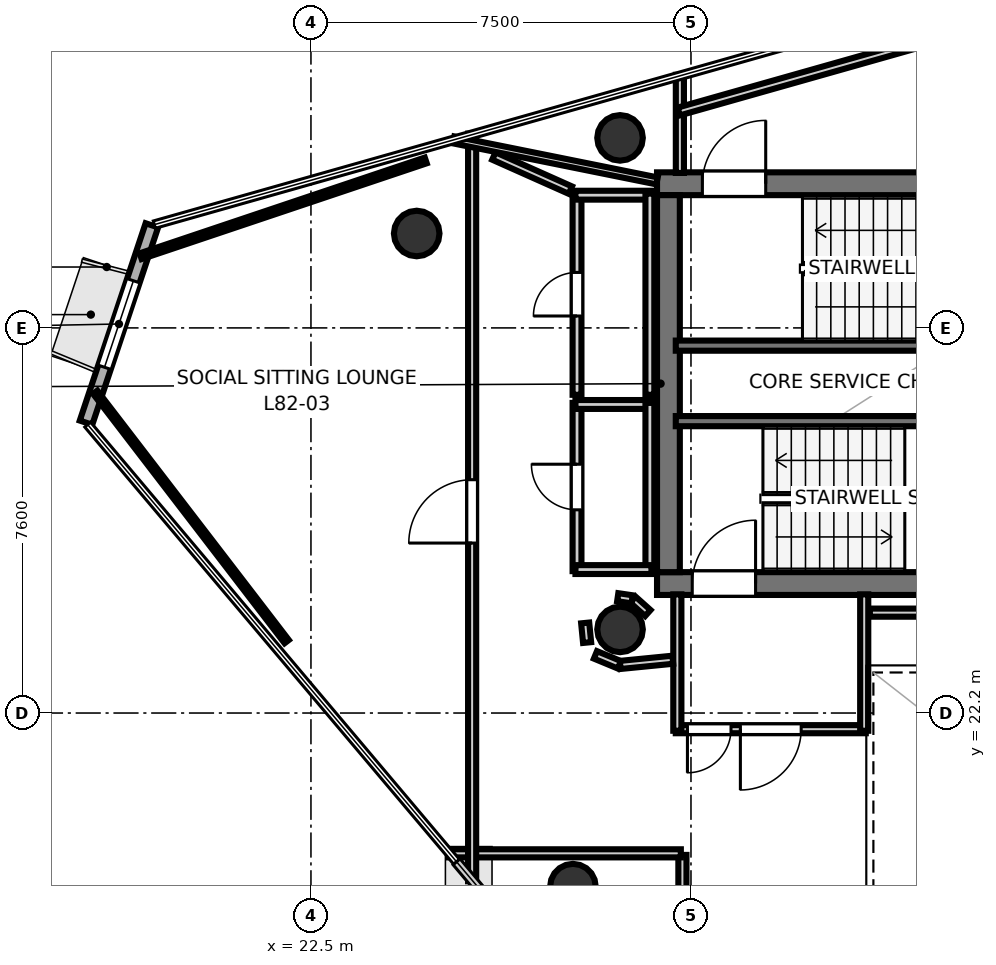
"""IFC4 building model, lengths in metres.
Left out: names, types, materials, properties, quantities, classifications, styles, units other than length and angle.
Written with IfcOpenShell. Run it as: python <this file> out.ifc"""

import sys

from ifc_helpers import new_model, si_unit, direction, frame, frame_2d, origin, origin_2d, place, context, subcontext, project, spatial, rectangle, hollow_circle, extrude, element, fill, save


model = new_model("IFC4")
c1 = context("Model", 3, precision=1e-05, world=origin(), true_north=direction((0.0, 1.0)))
c2 = subcontext(c1, "Body", "Model", "MODEL_VIEW")
j1 = project(units=[si_unit("LENGTHUNIT", "METRE"), si_unit("PLANEANGLEUNIT", "RADIAN")], contexts=[c1])
p1 = place(None, origin())
s1 = spatial("IfcSite", under=j1, at=p1, CompositionType="ELEMENT")
p2 = place(p1, origin())
s2 = spatial("IfcBuilding", under=s1, at=p2, CompositionType="ELEMENT")
p3 = place(p2, frame((0.0, 0.0, 317.6)))
s3 = spatial("IfcBuildingStorey", under=s2, at=p3, CompositionType="ELEMENT", Elevation=317.6)
p4 = place(p3, frame((29.33, 32.645, 0.0), z_axis=(0.0, 0.0, 1.0), x_axis=(1.0, 0.0, 0.0)))
e1 = element("IfcWall", 1, at=p4, inside=s3, PredefinedType="SHEAR", context=c2, shape_type="SweptSolid", body=[
    extrude(rectangle(XDim=10.52, YDim=0.45, at=frame_2d((5.26, 0.0))), origin(), (0.0, 0.0, 1.0), 3.4),
])
p5 = place(p4, frame((0.895, 0.0, 0.0)))
e2 = element("IfcOpeningElement", 2, at=p5, cuts=e1, PredefinedType="OPENING", context=c2, shape_type="SweptSolid", body=[
    extrude(rectangle(XDim=1.25, YDim=2.15, at=frame_2d((0.625, 1.075))), frame((0.0, 0.235, 0.0), z_axis=(0.0, -1.0, 0.0), x_axis=(1.0, 0.0, 0.0)), (0.0, 0.0, 1.0), 0.47),
])
p6 = place(p3, frame((29.33, 24.755, 0.0), z_axis=(0.0, 0.0, 1.0), x_axis=(1.0, 0.0, 0.0)))
e3 = element("IfcWall", 3, at=p6, inside=s3, PredefinedType="SHEAR", context=c2, shape_type="SweptSolid", body=[
    extrude(rectangle(XDim=10.52, YDim=0.45, at=frame_2d((5.26, 0.0))), origin(), (0.0, 0.0, 1.0), 3.4),
])
p7 = place(p6, frame((0.695, 0.0, 0.0)))
e4 = element("IfcOpeningElement", 4, at=p7, cuts=e3, PredefinedType="OPENING", context=c2, shape_type="SweptSolid", body=[
    extrude(rectangle(XDim=1.25, YDim=2.15, at=frame_2d((0.625, 1.075))), frame((0.0, 0.235, 0.0), z_axis=(0.0, -1.0, 0.0), x_axis=(1.0, 0.0, 0.0)), (0.0, 0.0, 1.0), 0.47),
])
p8 = place(p3, frame((29.555, 24.98, 0.0), z_axis=(0.0, 0.0, 1.0), x_axis=(0.0, 1.0, 0.0)))
e5 = element("IfcWall", 5, at=p8, inside=s3, PredefinedType="SHEAR", context=c2, shape_type="SweptSolid", body=[
    extrude(rectangle(XDim=7.44, YDim=0.45, at=frame_2d((3.72, 0.0))), origin(), (0.0, 0.0, 1.0), 3.4),
])
for number, where, z_axis, x_axis in (
    (6, (28.6, 33.55, 0.0), (0.0, 0.0, 1.0), (1.0, 0.0, 0.0)),
    (7, (28.6, 23.85, 0.0), (0.0, 0.0, 1.0), (1.0, 0.0, 0.0)),
    (8, (24.587, 31.663, 0.0), (0.0, 0.0, 1.0), (1.0, 0.0, 0.0)),
    (9, (27.67, 18.774, 0.0), (0.0, 0.0, 1.0), (1.0, 0.0, 0.0)),
):
    element("IfcColumn", number, at=place(p3, frame(where, z_axis=z_axis, x_axis=x_axis)), inside=s3, PredefinedType="COLUMN", context=c2, shape_type="SweptSolid", body=[
        extrude(hollow_circle(Radius=0.45, WallThickness=0.025, at=origin_2d()), origin(), (0.0, 0.0, 1.0), 3.7),
    ])
p9 = place(p3, frame((19.36, 31.824, 0.0), z_axis=(0.0, 0.0, 1.0), x_axis=(-0.316566733313, -0.948570241658, 0.0)))
e10 = element("IfcWall", 10, at=p9, inside=s3, PredefinedType="SOLIDWALL", context=c2, shape_type="SweptSolid", body=[
    extrude(rectangle(XDim=4.105, YDim=0.26, at=frame_2d((2.053, 0.0))), origin(), (0.0, 0.0, 1.0), 3.4),
])
p10 = place(p9, frame((1.153, 0.0, 0.85)))
e11 = element("IfcOpeningElement", 11, at=p10, cuts=e10, PredefinedType="OPENING", context=c2, shape_type="SweptSolid", body=[
    extrude(rectangle(XDim=1.8, YDim=2.1, at=frame_2d((0.9, 1.05))), frame((0.0, 0.14, 0.0), z_axis=(0.0, -1.0, 0.0), x_axis=(1.0, 0.0, 0.0)), (0.0, 0.0, 1.0), 0.28),
])
p11 = place(p3, frame((29.7, 29.45, 0.0), z_axis=(0.0, 0.0, 1.0), x_axis=(1.0, 0.0, 0.0)))
e12 = element("IfcWall", 12, at=p11, inside=s3, PredefinedType="SOLIDWALL", context=c2, shape_type="SweptSolid", body=[
    extrude(rectangle(XDim=8.3, YDim=0.2, at=frame_2d((4.15, 0.0))), origin(), (0.0, 0.0, 1.0), 3.4),
])
p12 = place(p3, frame((29.7, 27.96, 0.0), z_axis=(0.0, 0.0, 1.0), x_axis=(1.0, 0.0, 0.0)))
e13 = element("IfcWall", 13, at=p12, inside=s3, PredefinedType="SOLIDWALL", context=c2, shape_type="SweptSolid", body=[
    extrude(rectangle(XDim=7.75, YDim=0.2, at=frame_2d((3.875, 0.0))), origin(), (0.0, 0.0, 1.0), 3.4),
])
p13 = place(p3, frame((29.781, 32.858, 0.0), z_axis=(0.0, 0.0, 1.0), x_axis=(0.0, 1.0, 0.0)))
e14 = element("IfcWall", 14, at=p13, inside=s3, PredefinedType="PARTITIONING", context=c2, shape_type="SweptSolid", body=[
    extrude(rectangle(XDim=1.937, YDim=0.16, at=frame_2d((0.968, 0.0))), origin(), (0.0, 0.0, 1.0), 2.72),
])
p14 = place(p3, frame((29.758, 34.071, 0.0), z_axis=(0.0, 0.0, 1.0), x_axis=(0.962177906446, 0.272421872006, 0.0)))
e15 = element("IfcWall", 15, at=p14, inside=s3, PredefinedType="PARTITIONING", context=c2, shape_type="SweptSolid", body=[
    extrude(rectangle(XDim=7.379, YDim=0.16, at=frame_2d((3.689, 0.0))), origin(), (0.0, 0.0, 1.0), 2.72),
])
p15 = place(p3, frame((33.45, 21.881, 0.0), z_axis=(0.0, 0.0, 1.0), x_axis=(-1.0, 0.0, 0.0)))
e16 = element("IfcWall", 16, at=p15, inside=s3, PredefinedType="PARTITIONING", context=c2, shape_type="SweptSolid", body=[
    extrude(rectangle(XDim=3.75, YDim=0.16, at=frame_2d((1.875, 0.0))), origin(), (0.0, 0.0, 1.0), 2.72),
])
p16 = place(p15, frame((1.275, 0.0, 0.0)))
e17 = element("IfcOpeningElement", 17, at=p16, cuts=e16, PredefinedType="OPENING", context=c2, shape_type="SweptSolid", body=[
    extrude(rectangle(XDim=1.2, YDim=2.15, at=frame_2d((0.6, 1.075))), frame((0.0, 0.09, 0.0), z_axis=(0.0, -1.0, 0.0), x_axis=(1.0, 0.0, 0.0)), (0.0, 0.0, 1.0), 0.18),
])
p17 = place(p15, frame((2.66, 0.0, 0.0)))
e18 = element("IfcOpeningElement", 18, at=p17, cuts=e16, PredefinedType="OPENING", context=c2, shape_type="SweptSolid", body=[
    extrude(rectangle(XDim=0.86, YDim=2.05, at=frame_2d((0.43, 1.025))), frame((0.0, 0.09, 0.0), z_axis=(0.0, -1.0, 0.0), x_axis=(1.0, 0.0, 0.0)), (0.0, 0.0, 1.0), 0.18),
])
for number, where, z_axis, x_axis in (
    (19, (29.731, 21.85, 0.0), (0.0, 0.0, 1.0), (0.0, 1.0, 0.0)),
    (20, (33.419, 24.542, 0.0), (0.0, 0.0, 1.0), (0.0, -1.0, 0.0)),
):
    element("IfcWall", number, at=place(p3, frame(where, z_axis=z_axis, x_axis=x_axis)), inside=s3, PredefinedType="PARTITIONING", context=c2, shape_type="SweptSolid", body=[
        extrude(rectangle(XDim=2.692, YDim=0.16, at=frame_2d((1.346, 0.0))), origin(), (0.0, 0.0, 1.0), 2.72),
    ])
p18 = place(p3, frame((27.751, 25.0, 0.0), z_axis=(0.0, 0.0, 1.0), x_axis=(0.0, 1.0, 0.0)))
e21 = element("IfcWall", 21, at=p18, inside=s3, PredefinedType="PLUMBINGWALL", context=c2, shape_type="SweptSolid", body=[
    extrude(rectangle(XDim=3.32, YDim=0.175, at=frame_2d((1.66, 0.0))), origin(), (0.0, 0.0, 1.0), 2.72),
])
p19 = place(p18, frame((1.21, 0.0, 0.0)))
e22 = element("IfcOpeningElement", 22, at=p19, cuts=e21, PredefinedType="OPENING", context=c2, shape_type="SweptSolid", body=[
    extrude(rectangle(XDim=0.9, YDim=2.1, at=frame_2d((0.45, 1.05))), frame((0.0, 0.097, 0.0), z_axis=(0.0, -1.0, 0.0), x_axis=(1.0, 0.0, 0.0)), (0.0, 0.0, 1.0), 0.195),
])
p20 = place(p3, frame((27.72, 28.289, 0.0), z_axis=(0.0, 0.0, 1.0), x_axis=(1.0, 0.0, 0.0)))
e23 = element("IfcWall", 23, at=p20, inside=s3, PredefinedType="PLUMBINGWALL", context=c2, shape_type="SweptSolid", body=[
    extrude(rectangle(XDim=1.5, YDim=0.175, at=frame_2d((0.75, 0.0))), origin(), (0.0, 0.0, 1.0), 2.72),
])
p21 = place(p3, frame((29.189, 28.32, 0.0), z_axis=(0.0, 0.0, 1.0), x_axis=(0.0, -1.0, 0.0)))
e24 = element("IfcWall", 24, at=p21, inside=s3, PredefinedType="PLUMBINGWALL", context=c2, shape_type="SweptSolid", body=[
    extrude(rectangle(XDim=3.32, YDim=0.175, at=frame_2d((1.66, 0.0))), origin(), (0.0, 0.0, 1.0), 2.72),
])
p22 = place(p3, frame((29.22, 25.031, 0.0), z_axis=(0.0, 0.0, 1.0), x_axis=(-1.0, 0.0, 0.0)))
e25 = element("IfcWall", 25, at=p22, inside=s3, PredefinedType="PLUMBINGWALL", context=c2, shape_type="SweptSolid", body=[
    extrude(rectangle(XDim=1.5, YDim=0.175, at=frame_2d((0.75, 0.0))), origin(), (0.0, 0.0, 1.0), 2.72),
])
p23 = place(p3, frame((27.751, 28.48, 0.0), z_axis=(0.0, 0.0, 1.0), x_axis=(0.0, 1.0, 0.0)))
e26 = element("IfcWall", 26, at=p23, inside=s3, PredefinedType="PLUMBINGWALL", context=c2, shape_type="SweptSolid", body=[
    extrude(rectangle(XDim=3.97, YDim=0.175, at=frame_2d((1.985, 0.0))), origin(), (0.0, 0.0, 1.0), 2.72),
])
p24 = place(p23, frame((1.555, 0.0, 0.0)))
e27 = element("IfcOpeningElement", 27, at=p24, cuts=e26, PredefinedType="OPENING", context=c2, shape_type="SweptSolid", body=[
    extrude(rectangle(XDim=0.86, YDim=2.05, at=frame_2d((0.43, 1.025))), frame((0.0, 0.097, 0.0), z_axis=(0.0, -1.0, 0.0), x_axis=(1.0, 0.0, 0.0)), (0.0, 0.0, 1.0), 0.195),
])
p25 = place(p3, frame((27.72, 32.419, 0.0), z_axis=(0.0, 0.0, 1.0), x_axis=(1.0, 0.0, 0.0)))
e28 = element("IfcWall", 28, at=p25, inside=s3, PredefinedType="PLUMBINGWALL", context=c2, shape_type="SweptSolid", body=[
    extrude(rectangle(XDim=1.5, YDim=0.175, at=frame_2d((0.75, 0.0))), origin(), (0.0, 0.0, 1.0), 2.72),
])
p26 = place(p3, frame((29.189, 32.45, 0.0), z_axis=(0.0, 0.0, 1.0), x_axis=(0.0, -1.0, 0.0)))
e29 = element("IfcWall", 29, at=p26, inside=s3, PredefinedType="PLUMBINGWALL", context=c2, shape_type="SweptSolid", body=[
    extrude(rectangle(XDim=3.97, YDim=0.175, at=frame_2d((1.985, 0.0))), origin(), (0.0, 0.0, 1.0), 2.72),
])
p27 = place(p3, frame((29.149, 24.173, 0.0), z_axis=(0.0, 0.0, 1.0), x_axis=(-0.745225165416, 0.666812906917, 0.0)))
e30 = element("IfcWall", 30, at=p27, inside=s3, PredefinedType="PARTITIONING", context=c2, shape_type="SweptSolid", body=[
    extrude(rectangle(XDim=0.396, YDim=0.16, at=frame_2d((0.198, 0.0))), origin(), (0.0, 0.0, 1.0), 2.72),
])
p28 = place(p3, frame((28.838, 24.444, 0.0), z_axis=(0.0, 0.0, 1.0), x_axis=(-0.989449148305, 0.144880581578, 0.0)))
e31 = element("IfcWall", 31, at=p28, inside=s3, PredefinedType="PARTITIONING", context=c2, shape_type="SweptSolid", body=[
    extrude(rectangle(XDim=0.286, YDim=0.16, at=frame_2d((0.143, 0.0))), origin(), (0.0, 0.0, 1.0), 2.72),
])
p29 = place(p3, frame((37.872, 24.181, 0.0), z_axis=(0.0, 0.0, 1.0), x_axis=(-1.0, 0.0, 0.0)))
e32 = element("IfcWall", 32, at=p29, inside=s3, PredefinedType="PARTITIONING", context=c2, shape_type="SweptSolid", body=[
    extrude(rectangle(XDim=4.342, YDim=0.16, at=frame_2d((2.171, 0.0))), origin(), (0.0, 0.0, 1.0), 2.72),
])
p30 = place(p3, frame((26.11, 33.192, 0.0), z_axis=(0.0, 0.0, 1.0), x_axis=(0.913360499666, -0.407151811553, 0.0)))
e33 = element("IfcWall", 33, at=p30, inside=s3, PredefinedType="PARTITIONING", context=c2, shape_type="SweptSolid", body=[
    extrude(rectangle(XDim=1.654, YDim=0.16, at=frame_2d((0.827, 0.0))), origin(), (0.0, 0.0, 1.0), 2.72),
])
p31 = place(p3, frame((27.912, 23.978, 0.0), z_axis=(0.0, 0.0, 1.0), x_axis=(0.097888269922, -0.995197410875, 0.0)))
e34 = element("IfcWall", 34, at=p31, inside=s3, PredefinedType="PARTITIONING", context=c2, shape_type="SweptSolid", body=[
    extrude(rectangle(XDim=0.389, YDim=0.16, at=frame_2d((0.195, 0.0))), origin(), (0.0, 0.0, 1.0), 2.72),
])
p32 = place(p3, frame((28.115, 23.348, 0.0), z_axis=(0.0, 0.0, 1.0), x_axis=(0.923807847969, -0.382856448334, 0.0)))
e35 = element("IfcWall", 35, at=p32, inside=s3, PredefinedType="PARTITIONING", context=c2, shape_type="SweptSolid", body=[
    extrude(rectangle(XDim=0.513, YDim=0.16, at=frame_2d((0.256, 0.0))), origin(), (0.0, 0.0, 1.0), 2.72),
])
p33 = place(p3, frame((28.603, 23.149, 0.0), z_axis=(0.0, 0.0, 1.0), x_axis=(0.995179827095, 0.098066873836, 0.0)))
e36 = element("IfcWall", 36, at=p33, inside=s3, PredefinedType="PARTITIONING", context=c2, shape_type="SweptSolid", body=[
    extrude(rectangle(XDim=1.043, YDim=0.16, at=frame_2d((0.521, 0.0))), origin(), (0.0, 0.0, 1.0), 2.72),
])
p34 = place(p3, frame((29.831, 16.05, 0.0), z_axis=(0.0, 0.0, 1.0), x_axis=(0.0, 1.0, 0.0)))
e37 = element("IfcWall", 37, at=p34, inside=s3, PredefinedType="PARTITIONING", context=c2, shape_type="SweptSolid", body=[
    extrude(rectangle(XDim=3.35, YDim=0.16, at=frame_2d((1.675, 0.0))), origin(), (0.0, 0.0, 1.0), 2.72),
])
p35 = place(p3, frame((29.8, 19.431, 0.0), z_axis=(0.0, 0.0, 1.0), x_axis=(-1.0, 0.0, 0.0)))
e38 = element("IfcWall", 38, at=p35, inside=s3, PredefinedType="PARTITIONING", context=c2, shape_type="SweptSolid", body=[
    extrude(rectangle(XDim=4.587, YDim=0.16, at=frame_2d((2.293, 0.0))), origin(), (0.0, 0.0, 1.0), 2.72),
])
p36 = place(p3, frame((25.681, 18.88, 0.0), z_axis=(0.0, 0.0, 1.0), x_axis=(0.0, 1.0, 0.0)))
e39 = element("IfcWall", 39, at=p36, inside=s3, PredefinedType="PARTITIONING", context=c2, shape_type="SweptSolid", body=[
    extrude(rectangle(XDim=14.754, YDim=0.16, at=frame_2d((7.377, 0.0))), origin(), (0.0, 0.0, 1.0), 2.72),
])
p37 = place(p36, frame((6.674, 0.0, 0.0)))
e40 = element("IfcOpeningElement", 40, at=p37, cuts=e39, PredefinedType="OPENING", context=c2, shape_type="SweptSolid", body=[
    extrude(rectangle(XDim=1.25, YDim=2.2, at=frame_2d((0.625, 1.1))), frame((0.0, 0.09, 0.0), z_axis=(0.0, -1.0, 0.0), x_axis=(1.0, 0.0, 0.0)), (0.0, 0.0, 1.0), 0.18),
])
p38 = place(p3, frame((29.33, 32.701, 0.0), z_axis=(0.0, 0.0, 1.0), x_axis=(-0.980269851438, 0.197663902525, 0.0)))
e41 = element("IfcWall", 41, at=p38, inside=s3, PredefinedType="PARTITIONING", context=c2, shape_type="SweptSolid", body=[
    extrude(rectangle(XDim=4.094, YDim=0.14, at=frame_2d((2.047, 0.0))), origin(), (0.0, 0.0, 1.0), 2.72),
])
p39 = place(p3, frame((22.021, 23.609, 0.0), z_axis=(0.0, 0.0, 1.0), x_axis=(-0.609046833967, 0.793134259779, 0.0)))
e42 = element("IfcWall", 42, at=p39, inside=s3, PredefinedType="PARTITIONING", context=c2, shape_type="SweptSolid", body=[
    extrude(rectangle(XDim=6.204, YDim=0.105, at=frame_2d((3.102, 0.0))), origin(), (0.0, 0.0, 1.0), 2.72),
])
p40 = place(p3, frame((19.14, 31.215, 0.0), z_axis=(0.0, 0.0, 1.0), x_axis=(0.947936140825, 0.318460473086, 0.0)))
e43 = element("IfcWall", 43, at=p40, inside=s3, PredefinedType="PARTITIONING", context=c2, shape_type="SweptSolid", body=[
    extrude(rectangle(XDim=5.935, YDim=0.12, at=frame_2d((2.968, 0.0))), origin(), (0.0, 0.0, 1.0), 2.72),
])
p41 = place(p5, origin())
e44 = element("IfcDoor", 44, at=p41, inside=s3, OperationType="SINGLE_SWING_RIGHT", PredefinedType="DOOR", context=c2, shape_type="SweptSolid", body=[
    extrude(rectangle(XDim=1.25, YDim=2.15, at=frame_2d((0.625, 1.075))), frame((0.0, 0.025, 0.0), z_axis=(0.0, -1.0, 0.0), x_axis=(1.0, 0.0, 0.0)), (0.0, 0.0, 1.0), 0.05),
])
fill(e2, e44)
p42 = place(p7, origin())
e45 = element("IfcDoor", 45, at=p42, inside=s3, OperationType="SINGLE_SWING_RIGHT", PredefinedType="DOOR", context=c2, shape_type="SweptSolid", body=[
    extrude(rectangle(XDim=1.25, YDim=2.15, at=frame_2d((0.625, 1.075))), frame((0.0, 0.025, 0.0), z_axis=(0.0, -1.0, 0.0), x_axis=(1.0, 0.0, 0.0)), (0.0, 0.0, 1.0), 0.05),
])
fill(e4, e45)
p43 = place(p16, origin())
e46 = element("IfcDoor", 46, at=p43, inside=s3, OperationType="SINGLE_SWING_RIGHT", PredefinedType="DOOR", context=c2, shape_type="SweptSolid", body=[
    extrude(rectangle(XDim=1.2, YDim=2.15, at=frame_2d((0.6, 1.075))), frame((0.0, 0.025, 0.0), z_axis=(0.0, -1.0, 0.0), x_axis=(1.0, 0.0, 0.0)), (0.0, 0.0, 1.0), 0.05),
])
fill(e17, e46)
p44 = place(p19, origin())
e47 = element("IfcDoor", 47, at=p44, inside=s3, OperationType="SINGLE_SWING_RIGHT", PredefinedType="DOOR", context=c2, shape_type="SweptSolid", body=[
    extrude(rectangle(XDim=0.9, YDim=2.1, at=frame_2d((0.45, 1.05))), frame((0.0, 0.025, 0.0), z_axis=(0.0, -1.0, 0.0), x_axis=(1.0, 0.0, 0.0)), (0.0, 0.0, 1.0), 0.05),
])
fill(e22, e47)
p45 = place(p24, origin())
e48 = element("IfcDoor", 48, at=p45, inside=s3, OperationType="SINGLE_SWING_LEFT", PredefinedType="DOOR", context=c2, shape_type="SweptSolid", body=[
    extrude(rectangle(XDim=0.86, YDim=2.05, at=frame_2d((0.43, 1.025))), frame((0.0, 0.025, 0.0), z_axis=(0.0, -1.0, 0.0), x_axis=(1.0, 0.0, 0.0)), (0.0, 0.0, 1.0), 0.05),
])
fill(e27, e48)
p46 = place(p17, origin())
e49 = element("IfcDoor", 49, at=p46, inside=s3, OperationType="SINGLE_SWING_RIGHT", PredefinedType="DOOR", context=c2, shape_type="SweptSolid", body=[
    extrude(rectangle(XDim=0.86, YDim=2.05, at=frame_2d((0.43, 1.025))), frame((0.0, 0.025, 0.0), z_axis=(0.0, -1.0, 0.0), x_axis=(1.0, 0.0, 0.0)), (0.0, 0.0, 1.0), 0.05),
])
fill(e18, e49)
p47 = place(p37, origin())
e50 = element("IfcDoor", 50, at=p47, inside=s3, OperationType="SINGLE_SWING_LEFT", PredefinedType="DOOR", context=c2, shape_type="SweptSolid", body=[
    extrude(rectangle(XDim=1.25, YDim=2.2, at=frame_2d((0.625, 1.1))), frame((0.0, 0.025, 0.0), z_axis=(0.0, -1.0, 0.0), x_axis=(1.0, 0.0, 0.0)), (0.0, 0.0, 1.0), 0.05),
])
fill(e40, e50)
p48 = place(p10, origin())
e51 = element("IfcWindow", 51, at=p48, inside=s3, PartitioningType="SINGLE_PANEL", PredefinedType="WINDOW", context=c2, shape_type="SweptSolid", body=[
    extrude(rectangle(XDim=1.8, YDim=2.1, at=frame_2d((0.9, 1.05))), frame((0.0, 0.03, 0.0), z_axis=(0.0, -1.0, 0.0), x_axis=(1.0, 0.0, 0.0)), (0.0, 0.0, 1.0), 0.06),
])
fill(e11, e51)
save(model, sys.argv[1])
